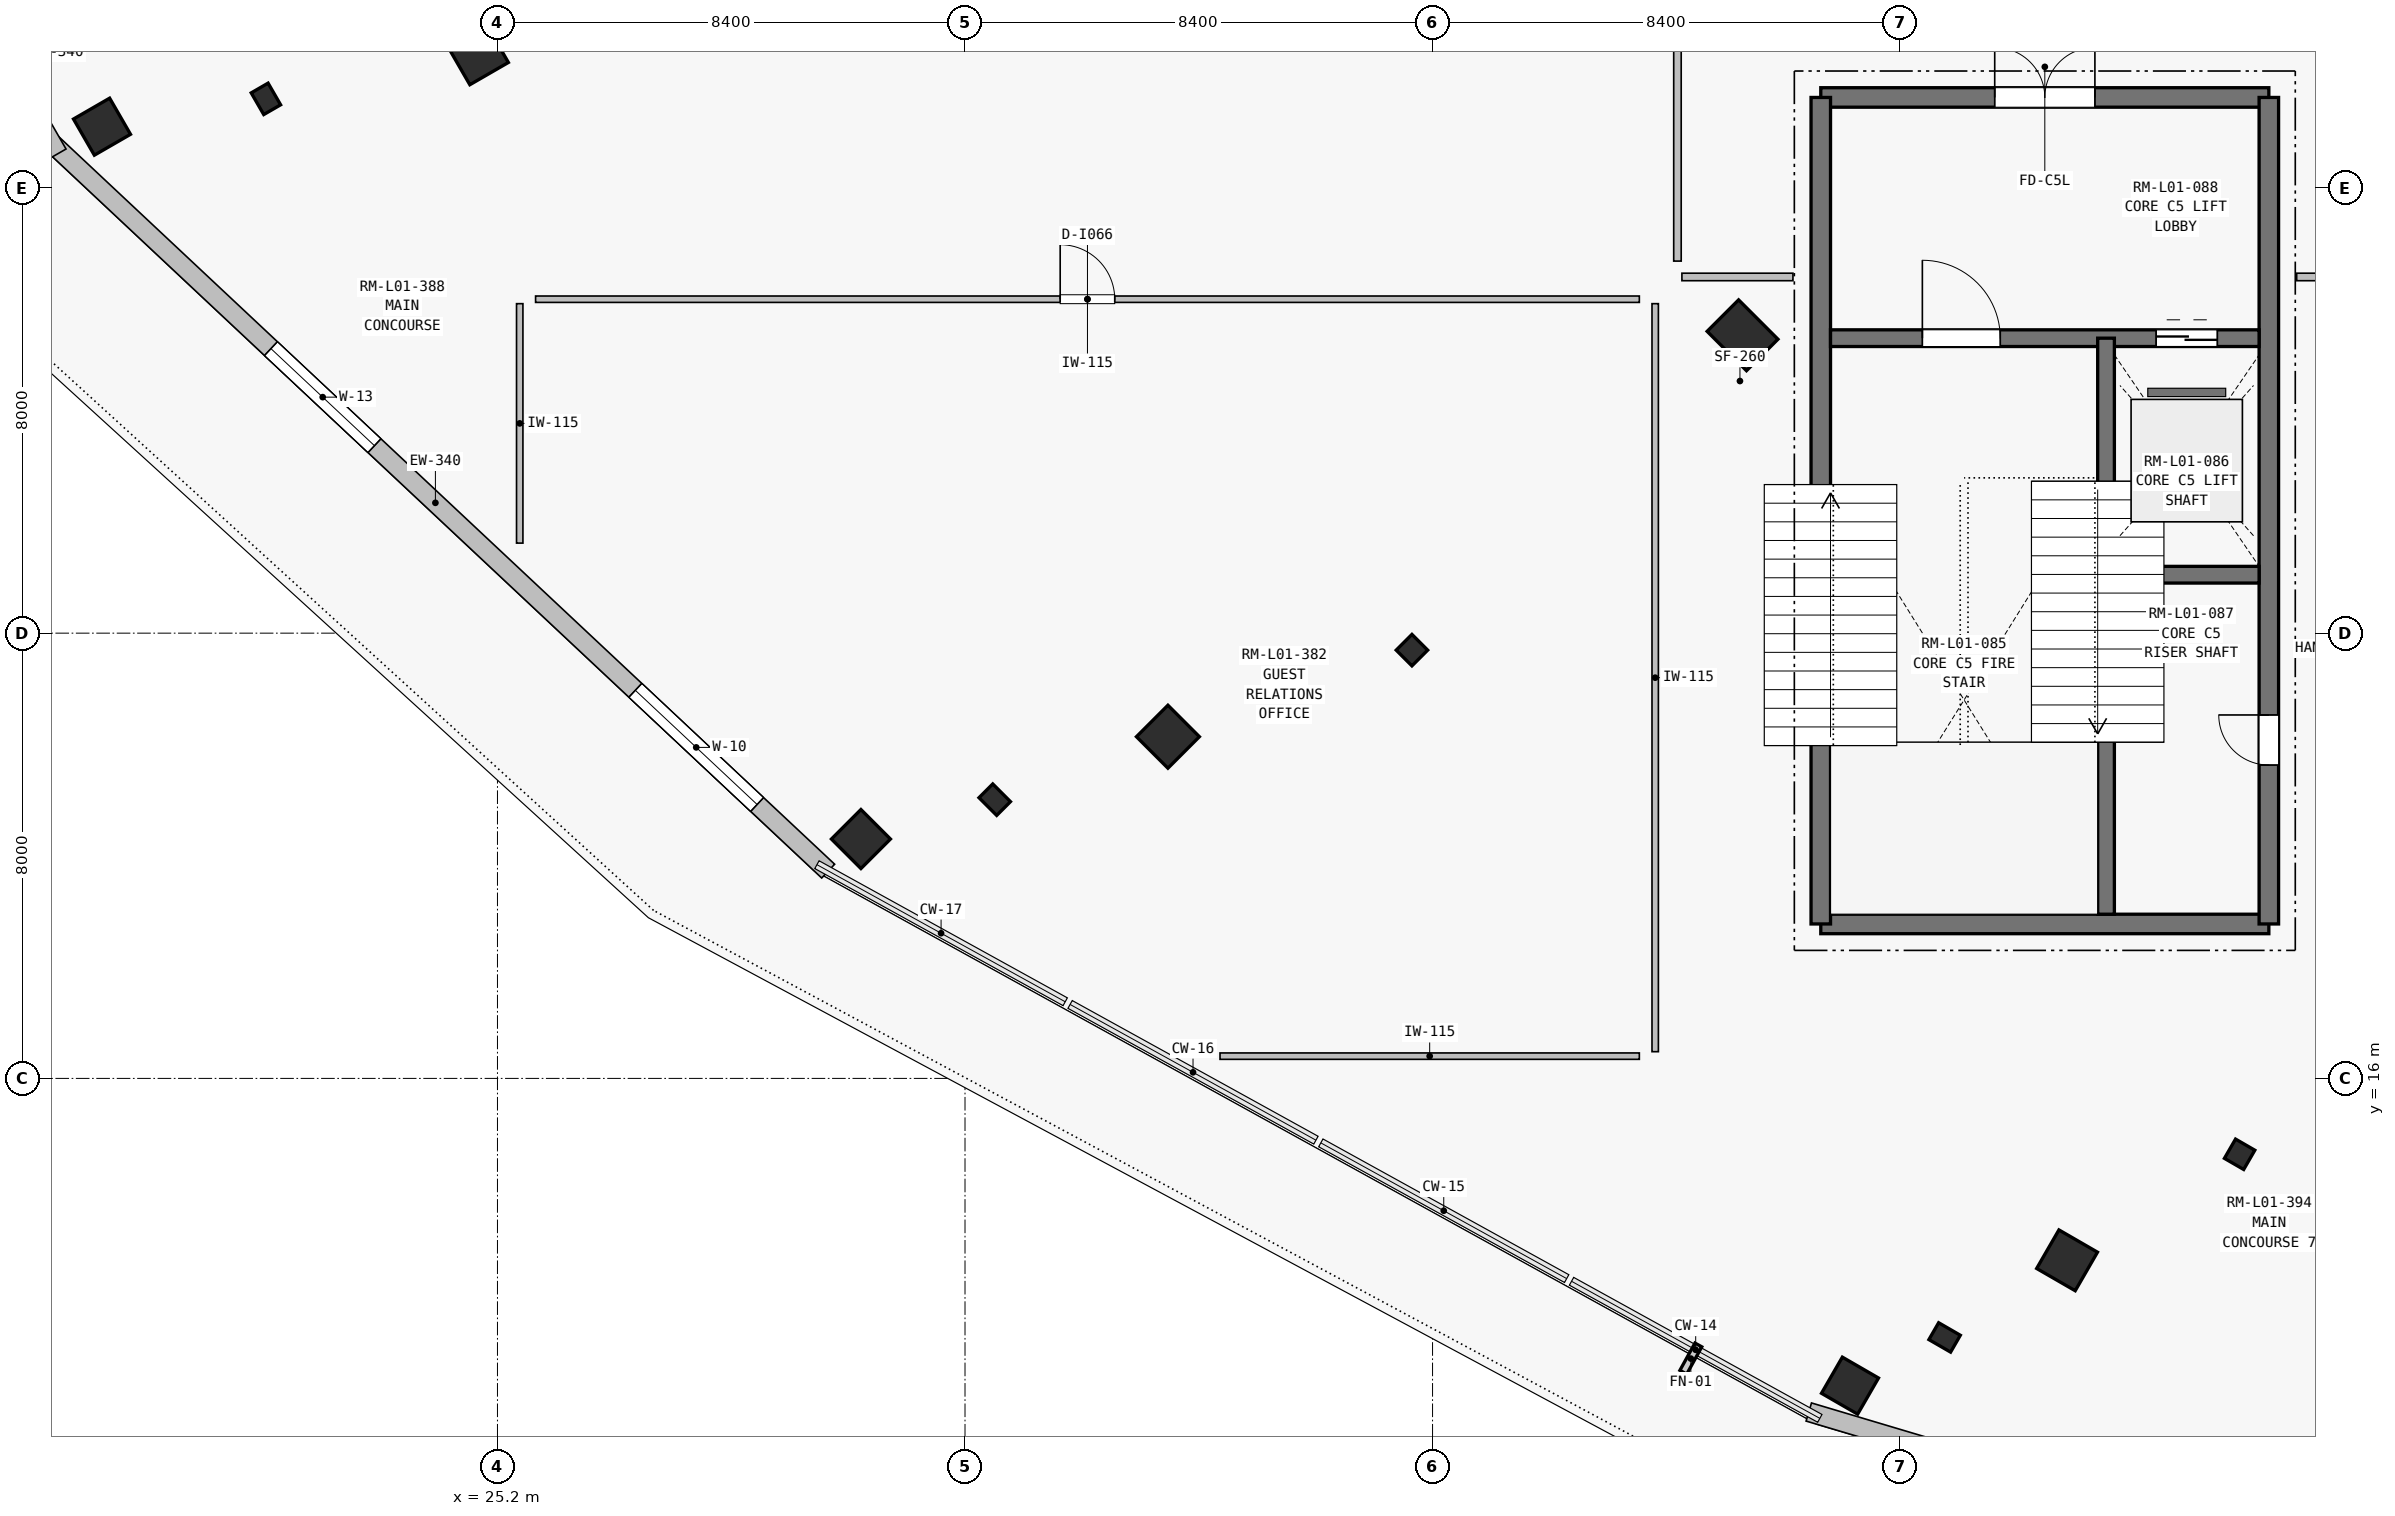
"""IFC4 building model, lengths in metres.
Left out: names, types, materials, properties, quantities, classifications, styles, units other than length and angle.
Written with IfcOpenShell. Run it as: python <this file> out.ifc"""

import sys

from ifc_helpers import new_model, si_unit, direction, frame, frame_2d, origin, origin_2d, place, context, subcontext, project, spatial, rectangle, i_section, extrude, element, fill, save


model = new_model("IFC4")
c1 = context("Model", 3, precision=1e-05, world=origin(), true_north=direction((0.0, 1.0)))
c2 = subcontext(c1, "Body", "Model", "MODEL_VIEW")
j1 = project(units=[si_unit("LENGTHUNIT", "METRE"), si_unit("PLANEANGLEUNIT", "RADIAN")], contexts=[c1])
p1 = place(None, origin())
s1 = spatial("IfcSite", under=j1, at=p1, CompositionType="ELEMENT")
p2 = place(p1, origin())
s2 = spatial("IfcBuilding", under=s1, at=p2, CompositionType="ELEMENT")
p3 = place(p2, frame((0.0, 0.0, 5.4)))
s3 = spatial("IfcBuildingStorey", under=s2, at=p3, CompositionType="ELEMENT", Elevation=5.4)
p4 = place(p3, frame((47.569, 29.352, 0.0), z_axis=(0.0, 0.0, 1.0), x_axis=(-0.707106781187, -0.707106781187, 0.0)))
e1 = element("IfcColumn", 1, at=p4, inside=s3, PredefinedType="COLUMN", context=c2, shape_type="SweptSolid", body=[
    extrude(rectangle(XDim=0.8, YDim=1.0, at=origin_2d()), origin(), (0.0, 0.0, 1.0), 4.5),
])
for number, where, z_axis, x_axis in (
    (2, (41.63, 23.695, 0.0), (0.0, 0.0, 1.0), (-0.707, -0.707, 0.0)),
    (3, (56.5, 14.637, 0.0), (0.0, 0.0, 1.0), (-0.5, -0.866, 0.0)),
):
    element("IfcColumn", number, at=place(p3, frame(where, z_axis=z_axis, x_axis=x_axis)), inside=s3, PredefinedType="COLUMN", context=c2, shape_type="SweptSolid", body=[
        extrude(i_section(OverallWidth=0.4, OverallDepth=0.4, WebThickness=0.018, FlangeThickness=0.032, at=origin_2d()), origin(), (0.0, 0.0, 1.0), 4.5),
    ])
for number, where, z_axis, x_axis in (
    (4, (24.85, 34.4, 0.0), (0.0, 0.0, 1.0), (-0.866, -0.5, 0.0)),
    (5, (37.246, 22.139, 0.0), (0.0, 0.0, 1.0), (-0.707, -0.707, 0.0)),
    (6, (53.4, 12.731, 0.0), (0.0, 0.0, 1.0), (-0.5, -0.866, 0.0)),
):
    element("IfcColumn", number, at=place(p3, frame(where, z_axis=z_axis, x_axis=x_axis)), inside=s3, PredefinedType="COLUMN", context=c2, shape_type="SweptSolid", body=[
        extrude(rectangle(XDim=0.8, YDim=0.8, at=origin_2d()), origin(), (0.0, 0.0, 1.0), 4.5),
    ])
for number, where, z_axis, x_axis in (
    (7, (18.095, 33.1, 0.0), (0.0, 0.0, 1.0), (-0.866, -0.5, 0.0)),
    (8, (31.73, 20.301, 0.0), (0.0, 0.0, 1.0), (-0.707, -0.707, 0.0)),
    (9, (49.5, 10.479, 0.0), (0.0, 0.0, 1.0), (-0.5, -0.866, 0.0)),
):
    element("IfcColumn", number, at=place(p3, frame(where, z_axis=z_axis, x_axis=x_axis)), inside=s3, PredefinedType="COLUMN", context=c2, shape_type="SweptSolid", body=[
        extrude(rectangle(XDim=0.75, YDim=0.75, at=origin_2d()), origin(), (0.0, 0.0, 1.0), 4.25),
    ])
for number, where, z_axis, x_axis in (
    (10, (21.04, 33.6, 0.0), (0.0, 0.0, 1.0), (-0.866, -0.5, 0.0)),
    (11, (34.134, 21.008, 0.0), (0.0, 0.0, 1.0), (-0.707, -0.707, 0.0)),
    (12, (51.2, 11.346, 0.0), (0.0, 0.0, 1.0), (-0.5, -0.866, 0.0)),
):
    element("IfcColumn", number, at=place(p3, frame(where, z_axis=z_axis, x_axis=x_axis)), inside=s3, PredefinedType="PILASTER", context=c2, shape_type="SweptSolid", body=[
        extrude(rectangle(XDim=0.35, YDim=0.45, at=origin_2d()), origin(), (0.0, 0.0, 1.0), 4.5),
    ])
p5 = place(p3, frame((70.12, 3.64, 0.0), z_axis=(0.0, 0.0, 1.0), x_axis=(-0.958339954226, 0.285630061678, 0.0)))
e13 = element("IfcWall", 13, at=p5, inside=s3, PredefinedType="SOLIDWALL", context=c2, shape_type="SweptSolid", body=[
    extrude(rectangle(XDim=22.289, YDim=0.34, at=frame_2d((11.145, 0.0))), origin(), (0.0, 0.0, 1.0), 4.25),
])
p6 = place(p5, frame((2.05, 0.0, 0.9)))
e14 = element("IfcOpeningElement", 14, at=p6, cuts=e13, PredefinedType="OPENING", context=c2, shape_type="SweptSolid", body=[
    extrude(rectangle(XDim=2.4, YDim=2.1, at=frame_2d((1.2, 1.05))), frame((0.0, 0.18, 0.0), z_axis=(0.0, -1.0, 0.0), x_axis=(1.0, 0.0, 0.0)), (0.0, 0.0, 1.0), 0.36),
])
p7 = place(p5, frame((6.8, 0.0, 0.9)))
e15 = element("IfcOpeningElement", 15, at=p7, cuts=e13, PredefinedType="OPENING", context=c2, shape_type="SweptSolid", body=[
    extrude(rectangle(XDim=2.1, YDim=2.0, at=frame_2d((1.05, 1.0))), frame((0.0, 0.18, 0.0), z_axis=(0.0, -1.0, 0.0), x_axis=(1.0, 0.0, 0.0)), (0.0, 0.0, 1.0), 0.36),
])
p8 = place(p5, frame((10.95, 0.0, 0.9)))
e16 = element("IfcOpeningElement", 16, at=p8, cuts=e13, PredefinedType="OPENING", context=c2, shape_type="SweptSolid", body=[
    extrude(rectangle(XDim=3.0, YDim=1.6, at=frame_2d((1.5, 0.8))), frame((0.0, 0.18, 0.0), z_axis=(0.0, -1.0, 0.0), x_axis=(1.0, 0.0, 0.0)), (0.0, 0.0, 1.0), 0.36),
])
p9 = place(p5, frame((15.7, 0.0, 0.9)))
e17 = element("IfcOpeningElement", 17, at=p9, cuts=e13, PredefinedType="OPENING", context=c2, shape_type="SweptSolid", body=[
    extrude(rectangle(XDim=2.7, YDim=1.55, at=frame_2d((1.35, 0.775))), frame((0.0, 0.18, 0.0), z_axis=(0.0, -1.0, 0.0), x_axis=(1.0, 0.0, 0.0)), (0.0, 0.0, 1.0), 0.36),
])
p10 = place(p3, frame((31.142, 19.724, 0.0), z_axis=(0.0, 0.0, 1.0), x_axis=(-0.729448660381, 0.684035563307, 0.0)))
e18 = element("IfcWall", 18, at=p10, inside=s3, PredefinedType="SOLIDWALL", context=c2, shape_type="SweptSolid", body=[
    extrude(rectangle(XDim=19.348, YDim=0.34, at=frame_2d((9.674, 0.0))), origin(), (0.0, 0.0, 1.0), 4.25),
])
p11 = place(p10, frame((1.75, 0.0, 0.9)))
e19 = element("IfcOpeningElement", 19, at=p11, cuts=e18, PredefinedType="OPENING", context=c2, shape_type="SweptSolid", body=[
    extrude(rectangle(XDim=3.0, YDim=1.6, at=frame_2d((1.5, 0.8))), frame((0.0, 0.18, 0.0), z_axis=(0.0, -1.0, 0.0), x_axis=(1.0, 0.0, 0.0)), (0.0, 0.0, 1.0), 0.36),
])
p12 = place(p10, frame((11.175, 0.0, 0.9)))
e20 = element("IfcOpeningElement", 20, at=p12, cuts=e18, PredefinedType="OPENING", context=c2, shape_type="SweptSolid", body=[
    extrude(rectangle(XDim=2.55, YDim=1.55, at=frame_2d((1.275, 0.775))), frame((0.0, 0.18, 0.0), z_axis=(0.0, -1.0, 0.0), x_axis=(1.0, 0.0, 0.0)), (0.0, 0.0, 1.0), 0.36),
])
p13 = place(p3, frame((17.302, 32.614, 0.0), z_axis=(0.0, 0.0, 1.0), x_axis=(-0.498920807722, 0.866647579828, 0.0)))
e21 = element("IfcWall", 21, at=p13, inside=s3, PredefinedType="SOLIDWALL", context=c2, shape_type="SweptSolid", body=[
    extrude(rectangle(XDim=4.202, YDim=0.34, at=frame_2d((2.101, 0.0))), origin(), (0.0, 0.0, 1.0), 4.25),
])
p14 = place(p3, frame((48.975, 18.775, 0.0), z_axis=(0.0, 0.0, 1.0), x_axis=(1.0, 0.0, 0.0)))
e22 = element("IfcWall", 22, at=p14, inside=s3, PredefinedType="SHEAR", context=c2, shape_type="SweptSolid", body=[
    extrude(rectangle(XDim=8.05, YDim=0.35, at=frame_2d((4.025, 0.0))), origin(), (0.0, 0.0, 1.0), 4.5),
])
p15 = place(p3, frame((48.975, 33.625, 0.0), z_axis=(0.0, 0.0, 1.0), x_axis=(1.0, 0.0, 0.0)))
e23 = element("IfcWall", 23, at=p15, inside=s3, PredefinedType="SHEAR", context=c2, shape_type="SweptSolid", body=[
    extrude(rectangle(XDim=8.05, YDim=0.35, at=frame_2d((4.025, 0.0))), origin(), (0.0, 0.0, 1.0), 4.5),
])
p16 = place(p15, frame((3.125, 0.0, 0.0)))
e24 = element("IfcOpeningElement", 24, at=p16, cuts=e23, PredefinedType="OPENING", context=c2, shape_type="SweptSolid", body=[
    extrude(rectangle(XDim=1.8, YDim=2.25, at=frame_2d((0.9, 1.125))), frame((0.0, 0.185, 0.0), z_axis=(0.0, -1.0, 0.0), x_axis=(1.0, 0.0, 0.0)), (0.0, 0.0, 1.0), 0.37),
])
p17 = place(p3, frame((48.975, 18.775, 0.0), z_axis=(0.0, 0.0, 1.0), x_axis=(0.0, 1.0, 0.0)))
e25 = element("IfcWall", 25, at=p17, inside=s3, PredefinedType="SHEAR", context=c2, shape_type="SweptSolid", body=[
    extrude(rectangle(XDim=14.85, YDim=0.35, at=frame_2d((7.425, 0.0))), origin(), (0.0, 0.0, 1.0), 4.5),
])
p18 = place(p3, frame((57.025, 18.775, 0.0), z_axis=(0.0, 0.0, 1.0), x_axis=(0.0, 1.0, 0.0)))
e26 = element("IfcWall", 26, at=p18, inside=s3, PredefinedType="SHEAR", context=c2, shape_type="SweptSolid", body=[
    extrude(rectangle(XDim=14.85, YDim=0.35, at=frame_2d((7.425, 0.0))), origin(), (0.0, 0.0, 1.0), 4.5),
])
p19 = place(p18, frame((2.855, 0.0, 0.0)))
e27 = element("IfcOpeningElement", 27, at=p19, cuts=e26, PredefinedType="OPENING", context=c2, shape_type="SweptSolid", body=[
    extrude(rectangle(XDim=0.9, YDim=2.1, at=frame_2d((0.45, 1.05))), frame((0.0, 0.185, 0.0), z_axis=(0.0, -1.0, 0.0), x_axis=(1.0, 0.0, 0.0)), (0.0, 0.0, 1.0), 0.37),
])
p20 = place(p3, frame((49.15, 29.3, 0.0), z_axis=(0.0, 0.0, 1.0), x_axis=(1.0, 0.0, 0.0)))
e28 = element("IfcWall", 28, at=p20, inside=s3, PredefinedType="SHEAR", context=c2, shape_type="SweptSolid", body=[
    extrude(rectangle(XDim=7.7, YDim=0.3, at=frame_2d((3.85, 0.0))), origin(), (0.0, 0.0, 1.0), 4.5),
])
p21 = place(p20, frame((1.65, 0.0, 0.0)))
e29 = element("IfcOpeningElement", 29, at=p21, cuts=e28, PredefinedType="OPENING", context=c2, shape_type="SweptSolid", body=[
    extrude(rectangle(XDim=1.4, YDim=2.2, at=frame_2d((0.7, 1.1))), frame((0.0, 0.16, 0.0), z_axis=(0.0, -1.0, 0.0), x_axis=(1.0, 0.0, 0.0)), (0.0, 0.0, 1.0), 0.32),
])
p22 = place(p20, frame((5.85, 0.0, 0.0)))
e30 = element("IfcOpeningElement", 30, at=p22, cuts=e28, PredefinedType="OPENING", context=c2, shape_type="SweptSolid", body=[
    extrude(rectangle(XDim=1.1, YDim=2.2, at=frame_2d((0.55, 1.1))), frame((0.0, 0.16, 0.0), z_axis=(0.0, -1.0, 0.0), x_axis=(1.0, 0.0, 0.0)), (0.0, 0.0, 1.0), 0.32),
])
p23 = place(p3, frame((54.1, 18.95, 0.0), z_axis=(0.0, 0.0, 1.0), x_axis=(0.0, 1.0, 0.0)))
e31 = element("IfcWall", 31, at=p23, inside=s3, PredefinedType="SHEAR", context=c2, shape_type="SweptSolid", body=[
    extrude(rectangle(XDim=10.35, YDim=0.3, at=frame_2d((5.175, 0.0))), origin(), (0.0, 0.0, 1.0), 4.5),
])
p24 = place(p3, frame((54.25, 25.05, 0.0), z_axis=(0.0, 0.0, 1.0), x_axis=(1.0, 0.0, 0.0)))
e32 = element("IfcWall", 32, at=p24, inside=s3, PredefinedType="SHEAR", context=c2, shape_type="SweptSolid", body=[
    extrude(rectangle(XDim=2.6, YDim=0.3, at=frame_2d((1.3, 0.0))), origin(), (0.0, 0.0, 1.0), 4.5),
])
p25 = place(p3, frame((48.475, 30.4, 0.0), z_axis=(0.0, 0.0, 1.0), x_axis=(-1.0, 0.0, 0.0)))
e33 = element("IfcWall", 33, at=p25, inside=s3, PredefinedType="PARTITIONING", context=c2, shape_type="SweptSolid", body=[
    extrude(rectangle(XDim=1.995, YDim=0.135, at=frame_2d((0.998, 0.0))), origin(), (0.0, 0.0, 1.0), 3.682),
])
p26 = place(p3, frame((46.4, 30.685, 0.0), z_axis=(0.0, 0.0, 1.0), x_axis=(0.0, 1.0, 0.0)))
e34 = element("IfcWall", 34, at=p26, inside=s3, PredefinedType="PARTITIONING", context=c2, shape_type="SweptSolid", body=[
    extrude(rectangle(XDim=15.235, YDim=0.135, at=frame_2d((7.618, 0.0))), origin(), (0.0, 0.0, 1.0), 2.323),
])
p27 = place(p26, frame((7.167, 0.0, 0.0)))
e35 = element("IfcOpeningElement", 35, at=p27, cuts=e34, PredefinedType="OPENING", context=c2, shape_type="SweptSolid", body=[
    extrude(rectangle(XDim=0.9, YDim=2.1, at=frame_2d((0.45, 1.05))), frame((0.0, 0.077, 0.0), z_axis=(0.0, -1.0, 0.0), x_axis=(1.0, 0.0, 0.0)), (0.0, 0.0, 1.0), 0.155),
])
p28 = place(p3, frame((60.379, 30.4, 0.0), z_axis=(0.0, 0.0, 1.0), x_axis=(-1.0, 0.0, 0.0)))
e36 = element("IfcWall", 36, at=p28, inside=s3, PredefinedType="PARTITIONING", context=c2, shape_type="SweptSolid", body=[
    extrude(rectangle(XDim=2.854, YDim=0.135, at=frame_2d((1.427, 0.0))), origin(), (0.0, 0.0, 1.0), 4.24),
])
p29 = place(p3, frame((46.0, 29.92, 0.0), z_axis=(0.0, 0.0, 1.0), x_axis=(0.0, -1.0, 0.0)))
e37 = element("IfcWall", 37, at=p29, inside=s3, PredefinedType="PARTITIONING", context=c2, shape_type="SweptSolid", body=[
    extrude(rectangle(XDim=13.44, YDim=0.115, at=frame_2d((6.72, 0.0))), origin(), (0.0, 0.0, 1.0), 3.682),
])
p30 = place(p3, frame((45.715, 16.4, 0.0), z_axis=(0.0, 0.0, 1.0), x_axis=(-1.0, 0.0, 0.0)))
e38 = element("IfcWall", 38, at=p30, inside=s3, PredefinedType="PARTITIONING", context=c2, shape_type="SweptSolid", body=[
    extrude(rectangle(XDim=7.534, YDim=0.115, at=frame_2d((3.767, 0.0))), origin(), (0.0, 0.0, 1.0), 4.24),
])
p31 = place(p3, frame((25.6, 25.618, 0.0), z_axis=(0.0, 0.0, 1.0), x_axis=(0.0, 1.0, 0.0)))
e39 = element("IfcWall", 39, at=p31, inside=s3, PredefinedType="PARTITIONING", context=c2, shape_type="SweptSolid", body=[
    extrude(rectangle(XDim=4.302, YDim=0.115, at=frame_2d((2.151, 0.0))), origin(), (0.0, 0.0, 1.0), 4.25),
])
p32 = place(p3, frame((25.885, 30.0, 0.0), z_axis=(0.0, 0.0, 1.0), x_axis=(1.0, 0.0, 0.0)))
e40 = element("IfcWall", 40, at=p32, inside=s3, PredefinedType="PARTITIONING", context=c2, shape_type="SweptSolid", body=[
    extrude(rectangle(XDim=19.83, YDim=0.115, at=frame_2d((9.915, 0.0))), origin(), (0.0, 0.0, 1.0), 3.515),
])
p33 = place(p32, frame((9.425, 0.0, 0.0)))
e41 = element("IfcOpeningElement", 41, at=p33, cuts=e40, PredefinedType="OPENING", context=c2, shape_type="SweptSolid", body=[
    extrude(rectangle(XDim=0.98, YDim=2.15, at=frame_2d((0.49, 1.075))), frame((0.0, 0.067, 0.0), z_axis=(0.0, -1.0, 0.0), x_axis=(1.0, 0.0, 0.0)), (0.0, 0.0, 1.0), 0.135),
])
p34 = place(p11, origin())
e42 = element("IfcWindow", 42, at=p34, inside=s3, PartitioningType="SINGLE_PANEL", PredefinedType="WINDOW", context=c2, shape_type="SweptSolid", body=[
    extrude(rectangle(XDim=3.0, YDim=1.6, at=frame_2d((1.5, 0.8))), frame((0.0, 0.03, 0.0), z_axis=(0.0, -1.0, 0.0), x_axis=(1.0, 0.0, 0.0)), (0.0, 0.0, 1.0), 0.06),
])
fill(e19, e42)
p35 = place(p12, origin())
e43 = element("IfcWindow", 43, at=p35, inside=s3, PartitioningType="SINGLE_PANEL", PredefinedType="WINDOW", context=c2, shape_type="SweptSolid", body=[
    extrude(rectangle(XDim=2.55, YDim=1.55, at=frame_2d((1.275, 0.775))), frame((0.0, 0.03, 0.0), z_axis=(0.0, -1.0, 0.0), x_axis=(1.0, 0.0, 0.0)), (0.0, 0.0, 1.0), 0.06),
])
fill(e20, e43)
p36 = place(p16, origin())
e44 = element("IfcDoor", 44, at=p36, inside=s3, OperationType="DOUBLE_DOOR_SINGLE_SWING", PredefinedType="DOOR", context=c2, shape_type="SweptSolid", body=[
    extrude(rectangle(XDim=1.8, YDim=2.25, at=frame_2d((0.9, 1.125))), frame((0.0, 0.025, 0.0), z_axis=(0.0, -1.0, 0.0), x_axis=(1.0, 0.0, 0.0)), (0.0, 0.0, 1.0), 0.05),
])
fill(e24, e44)
p37 = place(p21, origin())
e45 = element("IfcDoor", 45, at=p37, inside=s3, OperationType="SINGLE_SWING_LEFT", PredefinedType="DOOR", context=c2, shape_type="SweptSolid", body=[
    extrude(rectangle(XDim=1.4, YDim=2.2, at=frame_2d((0.7, 1.1))), frame((0.0, 0.025, 0.0), z_axis=(0.0, -1.0, 0.0), x_axis=(1.0, 0.0, 0.0)), (0.0, 0.0, 1.0), 0.05),
])
fill(e29, e45)
p38 = place(p19, origin())
e46 = element("IfcDoor", 46, at=p38, inside=s3, OperationType="SINGLE_SWING_RIGHT", PredefinedType="DOOR", context=c2, shape_type="SweptSolid", body=[
    extrude(rectangle(XDim=0.9, YDim=2.1, at=frame_2d((0.45, 1.05))), frame((0.0, 0.025, 0.0), z_axis=(0.0, -1.0, 0.0), x_axis=(1.0, 0.0, 0.0)), (0.0, 0.0, 1.0), 0.05),
])
fill(e27, e46)
p39 = place(p22, origin())
e47 = element("IfcDoor", 47, at=p39, inside=s3, OperationType="SLIDING_TO_LEFT", PredefinedType="DOOR", context=c2, shape_type="SweptSolid", body=[
    extrude(rectangle(XDim=1.1, YDim=2.2, at=frame_2d((0.55, 1.1))), frame((0.0, 0.025, 0.0), z_axis=(0.0, -1.0, 0.0), x_axis=(1.0, 0.0, 0.0)), (0.0, 0.0, 1.0), 0.05),
])
fill(e30, e47)
p40 = place(p33, origin())
e48 = element("IfcDoor", 48, at=p40, inside=s3, OperationType="SINGLE_SWING_LEFT", PredefinedType="DOOR", context=c2, shape_type="SweptSolid", body=[
    extrude(rectangle(XDim=0.98, YDim=2.15, at=frame_2d((0.49, 1.075))), frame((0.0, 0.025, 0.0), z_axis=(0.0, -1.0, 0.0), x_axis=(1.0, 0.0, 0.0)), (0.0, 0.0, 1.0), 0.05),
])
fill(e41, e48)
save(model, sys.argv[1])
